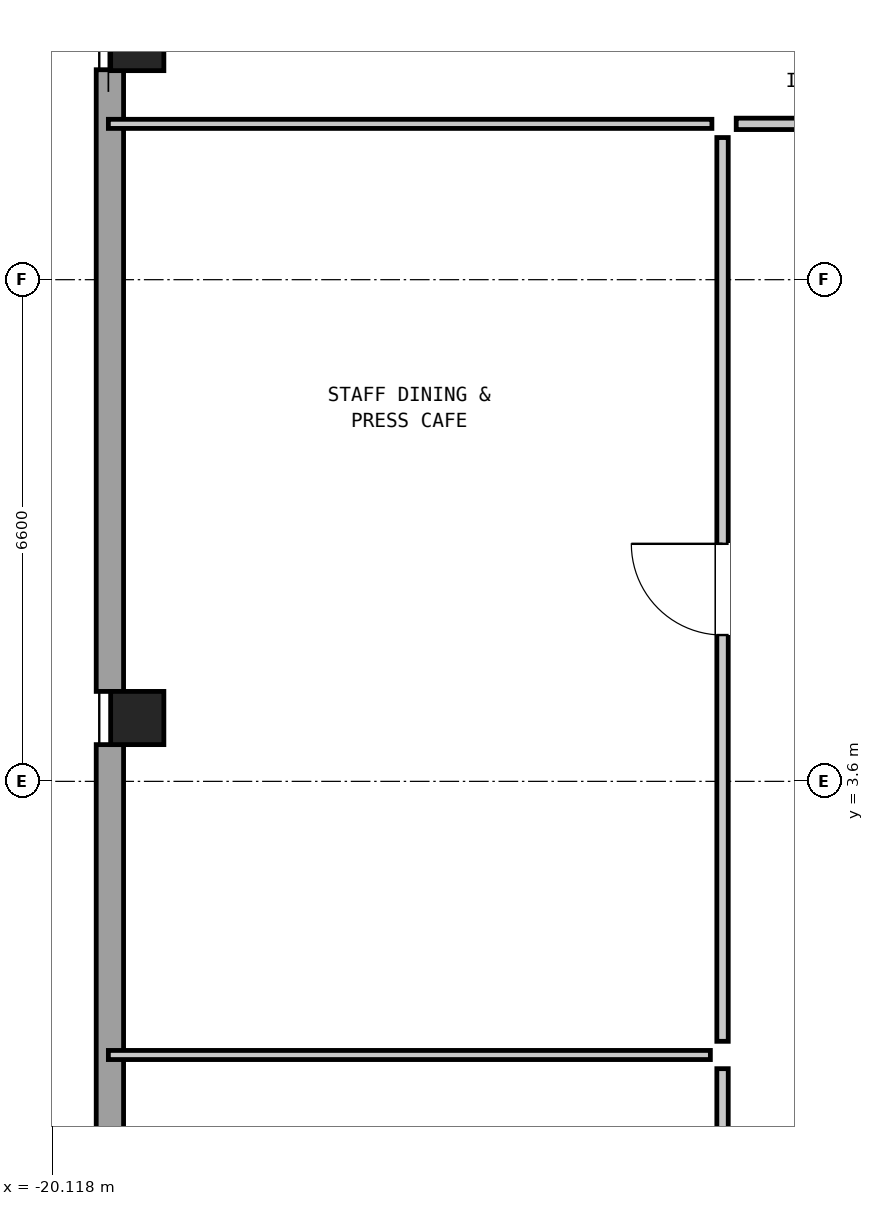
"""IFC4 building model, lengths in metres.
Left out: names, types, materials, properties, quantities, classifications, styles, units other than length and angle.
Written with IfcOpenShell. Run it as: python <this file> out.ifc"""

import sys

from ifc_helpers import new_model, si_unit, direction, frame, frame_2d, origin, origin_2d, place, context, subcontext, project, spatial, rectangle, hollow_rectangle, extrude, element, fill, save


model = new_model("IFC4")
c1 = context("Model", 3, precision=1e-05, world=origin(), true_north=direction((0.0, 1.0)))
c2 = subcontext(c1, "Body", "Model", "MODEL_VIEW")
j1 = project(units=[si_unit("LENGTHUNIT", "METRE"), si_unit("PLANEANGLEUNIT", "RADIAN")], contexts=[c1])
p1 = place(None, origin())
s1 = spatial("IfcSite", under=j1, at=p1, CompositionType="ELEMENT")
p2 = place(p1, origin())
s2 = spatial("IfcBuilding", under=s1, at=p2, CompositionType="ELEMENT")
p3 = place(p2, frame((0.0, 0.0, 223.9)))
s3 = spatial("IfcBuildingStorey", under=s2, at=p3, CompositionType="ELEMENT", Elevation=223.9)
for number, where, z_axis, x_axis in (
    (1, (-19.0, 13.3, 0.0), (0.0, 0.0, 1.0), (0.0, 1.0, 0.0)),
    (2, (-19.0, 4.433, 0.0), (0.0, 0.0, 1.0), (0.0, 1.0, 0.0)),
):
    element("IfcColumn", number, at=place(p3, frame(where, z_axis=z_axis, x_axis=x_axis)), inside=s3, PredefinedType="COLUMN", context=c2, shape_type="SweptSolid", body=[
        extrude(hollow_rectangle(XDim=0.7, YDim=0.7, WallThickness=0.045, at=origin_2d()), origin(), (0.0, 0.0, 1.0), 3.05),
    ])
p4 = place(p3, frame((-19.36, -4.083, 0.0), z_axis=(0.0, 0.0, 1.0), x_axis=(0.0, 1.0, 0.0)))
e3 = element("IfcWall", 3, at=p4, inside=s3, PredefinedType="SOLIDWALL", context=c2, shape_type="SweptSolid", body=[
    extrude(rectangle(XDim=8.167, YDim=0.36, at=frame_2d((4.083, 0.0))), origin(), (0.0, 0.0, 1.0), 0.98),
])
p5 = place(p3, frame((-19.36, 4.783, 0.0), z_axis=(0.0, 0.0, 1.0), x_axis=(0.0, 1.0, 0.0)))
e4 = element("IfcWall", 4, at=p5, inside=s3, PredefinedType="SOLIDWALL", context=c2, shape_type="SweptSolid", body=[
    extrude(rectangle(XDim=8.179, YDim=0.36, at=frame_2d((4.089, 0.0))), origin(), (0.0, 0.0, 1.0), 0.98),
])
p6 = place(p3, frame((-19.38, 12.25, 0.0), z_axis=(0.0, 0.0, 1.0), x_axis=(1.0, 0.0, 0.0)))
e5 = element("IfcWall", 5, at=p6, inside=s3, PredefinedType="PARTITIONING", context=c2, shape_type="SweptSolid", body=[
    extrude(rectangle(XDim=7.94, YDim=0.12, at=frame_2d((3.97, 0.0))), origin(), (0.0, 0.0, 1.0), 2.86),
])
p7 = place(p3, frame((-19.38, 0.0, 0.0), z_axis=(0.0, 0.0, 1.0), x_axis=(1.0, 0.0, 0.0)))
e6 = element("IfcWall", 6, at=p7, inside=s3, PredefinedType="PARTITIONING", context=c2, shape_type="SweptSolid", body=[
    extrude(rectangle(XDim=7.92, YDim=0.12, at=frame_2d((3.96, 0.0))), origin(), (0.0, 0.0, 1.0), 2.86),
])
p8 = place(p3, frame((-11.12, 12.25, 0.0), z_axis=(0.0, 0.0, 1.0), x_axis=(1.0, 0.0, 0.0)))
e7 = element("IfcWall", 7, at=p8, inside=s3, PredefinedType="PARTITIONING", context=c2, shape_type="SweptSolid", body=[
    extrude(rectangle(XDim=5.54, YDim=0.15, at=frame_2d((2.77, 0.0))), origin(), (0.0, 0.0, 1.0), 2.86),
])
p9 = place(p8, frame((2.17, 0.0, 0.0)))
e8 = element("IfcOpeningElement", 8, at=p9, cuts=e7, PredefinedType="OPENING", context=c2, shape_type="SweptSolid", body=[
    extrude(rectangle(XDim=1.2, YDim=2.1, at=frame_2d((0.6, 1.05))), frame((0.0, 0.087, 0.0), z_axis=(0.0, -1.0, 0.0), x_axis=(1.0, 0.0, 0.0)), (0.0, 0.0, 1.0), 0.174),
])
p10 = place(p3, frame((-11.3, -10.87, 0.0), z_axis=(0.0, 0.0, 1.0), x_axis=(0.0, 1.0, 0.0)))
e9 = element("IfcWall", 9, at=p10, inside=s3, PredefinedType="PARTITIONING", context=c2, shape_type="SweptSolid", body=[
    extrude(rectangle(XDim=10.69, YDim=0.15, at=frame_2d((5.345, 0.0))), origin(), (0.0, 0.0, 1.0), 2.86),
])
p11 = place(p10, frame((4.745, 0.0, 0.0)))
e10 = element("IfcOpeningElement", 10, at=p11, cuts=e9, PredefinedType="OPENING", context=c2, shape_type="SweptSolid", body=[
    extrude(rectangle(XDim=1.2, YDim=2.1, at=frame_2d((0.6, 1.05))), frame((0.0, 0.087, 0.0), z_axis=(0.0, -1.0, 0.0), x_axis=(1.0, 0.0, 0.0)), (0.0, 0.0, 1.0), 0.174),
])
p12 = place(p3, frame((-11.3, 0.18, 0.0), z_axis=(0.0, 0.0, 1.0), x_axis=(0.0, 1.0, 0.0)))
e11 = element("IfcWall", 11, at=p12, inside=s3, PredefinedType="PARTITIONING", context=c2, shape_type="SweptSolid", body=[
    extrude(rectangle(XDim=11.89, YDim=0.15, at=frame_2d((5.945, 0.0))), origin(), (0.0, 0.0, 1.0), 2.86),
])
p13 = place(p12, frame((5.345, 0.0, 0.0)))
e12 = element("IfcOpeningElement", 12, at=p13, cuts=e11, PredefinedType="OPENING", context=c2, shape_type="SweptSolid", body=[
    extrude(rectangle(XDim=1.2, YDim=2.1, at=frame_2d((0.6, 1.05))), frame((0.0, 0.087, 0.0), z_axis=(0.0, -1.0, 0.0), x_axis=(1.0, 0.0, 0.0)), (0.0, 0.0, 1.0), 0.174),
])
p14 = place(p13, origin())
e13 = element("IfcDoor", 13, at=p14, inside=s3, OperationType="SINGLE_SWING_RIGHT", PredefinedType="DOOR", context=c2, shape_type="SweptSolid", body=[
    extrude(rectangle(XDim=1.2, YDim=2.1, at=frame_2d((0.6, 1.05))), frame((0.0, 0.025, 0.0), z_axis=(0.0, -1.0, 0.0), x_axis=(1.0, 0.0, 0.0)), (0.0, 0.0, 1.0), 0.05),
])
fill(e12, e13)
save(model, sys.argv[1])
